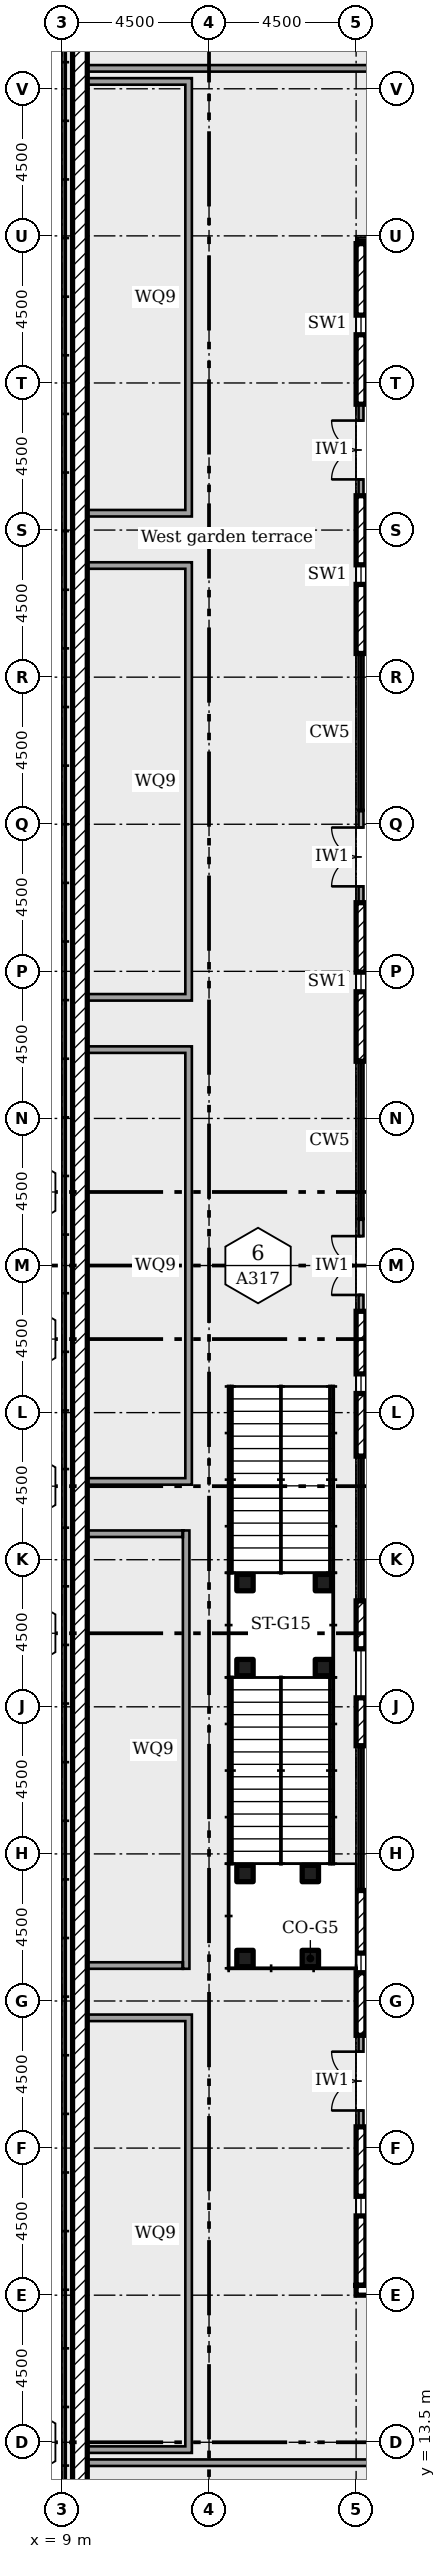
"""IFC4 building model, lengths in metres.
Left out: names, types, materials, properties, quantities, classifications, styles, units other than length and angle.
Written with IfcOpenShell. Run it as: python <this file> out.ifc"""

import sys

from ifc_helpers import new_model, si_unit, direction, frame, frame_2d, origin, origin_2d, place, context, subcontext, project, spatial, rectangle, extrude, element, fill, save


model = new_model("IFC4")
c1 = context("Model", 3, precision=1e-05, world=origin(), true_north=direction((0.0, 1.0)))
c2 = subcontext(c1, "Body", "Model", "MODEL_VIEW")
j1 = project(units=[si_unit("LENGTHUNIT", "METRE"), si_unit("PLANEANGLEUNIT", "RADIAN")], contexts=[c1])
p1 = place(None, origin())
s1 = spatial("IfcSite", under=j1, at=p1, CompositionType="ELEMENT")
p2 = place(p1, origin())
s2 = spatial("IfcBuilding", under=s1, at=p2, CompositionType="ELEMENT")
p3 = place(p2, frame((0.0, 0.0, 11.5)))
s3 = spatial("IfcBuildingStorey", under=s2, at=p3, CompositionType="ELEMENT", Elevation=11.5)
p4 = place(p3, frame((18.0, 18.15, 0.0)))
e1 = element("IfcWall", 1, at=p4, inside=s3, PredefinedType="ELEMENTEDWALL", context=c2, shape_type="SweptSolid", body=[
    extrude(rectangle(XDim=4.925, YDim=0.3, at=frame_2d((2.462, 0.0))), origin(), (0.0, 0.0, 1.0), 4.55),
])
p5 = place(p4, frame((2.163, 0.0, 0.45)))
e2 = element("IfcOpeningElement", 2, at=p5, cuts=e1, PredefinedType="OPENING", context=c2, shape_type="SweptSolid", body=[
    extrude(rectangle(XDim=0.6, YDim=2.4, at=frame_2d((0.3, 1.2))), frame((0.0, 0.16, 0.0), z_axis=(0.0, -1.0, 0.0), x_axis=(1.0, 0.0, 0.0)), (0.0, 0.0, 1.0), 0.32),
])
p6 = place(p3, frame((18.15, 80.762, 0.0), z_axis=(0.0, 0.0, 1.0), x_axis=(0.0, -1.0, 0.0)))
e3 = element("IfcWall", 3, at=p6, inside=s3, PredefinedType="ELEMENTEDWALL", context=c2, shape_type="SweptSolid", body=[
    extrude(rectangle(XDim=4.912, YDim=0.3, at=frame_2d((2.456, 0.0))), origin(), (0.0, 0.0, 1.0), 4.55),
])
p7 = place(p6, frame((2.188, 0.0, 0.45)))
e4 = element("IfcOpeningElement", 4, at=p7, cuts=e3, PredefinedType="OPENING", context=c2, shape_type="SweptSolid", body=[
    extrude(rectangle(XDim=0.6, YDim=2.4, at=frame_2d((0.3, 1.2))), frame((0.0, 0.16, 0.0), z_axis=(0.0, -1.0, 0.0), x_axis=(1.0, 0.0, 0.0)), (0.0, 0.0, 1.0), 0.32),
])
p8 = place(p3, frame((18.15, 75.85, 0.0), z_axis=(0.0, 0.0, 1.0), x_axis=(0.0, -1.0, 0.0)))
e5 = element("IfcWall", 5, at=p8, inside=s3, PredefinedType="SOLIDWALL", context=c2, shape_type="SweptSolid", body=[
    extrude(rectangle(XDim=2.8, YDim=0.15, at=frame_2d((1.4, 0.0))), origin(), (0.0, 0.0, 1.0), 4.55),
])
p9 = place(p8, frame((0.5, 0.0, 0.0)))
e6 = element("IfcOpeningElement", 6, at=p9, cuts=e5, PredefinedType="OPENING", context=c2, shape_type="SweptSolid", body=[
    extrude(rectangle(XDim=1.8, YDim=2.4, at=frame_2d((0.9, 1.2))), frame((0.0, 0.085, 0.0), z_axis=(0.0, -1.0, 0.0), x_axis=(1.0, 0.0, 0.0)), (0.0, 0.0, 1.0), 0.17),
])
p10 = place(p3, frame((18.15, 73.05, 0.0), z_axis=(0.0, 0.0, 1.0), x_axis=(0.0, -1.0, 0.0)))
e7 = element("IfcWall", 7, at=p10, inside=s3, PredefinedType="ELEMENTEDWALL", context=c2, shape_type="SweptSolid", body=[
    extrude(rectangle(XDim=4.825, YDim=0.3, at=frame_2d((2.413, 0.0))), origin(), (0.0, 0.0, 1.0), 4.55),
])
p11 = place(p10, frame((2.113, 0.0, 0.45)))
e8 = element("IfcOpeningElement", 8, at=p11, cuts=e7, PredefinedType="OPENING", context=c2, shape_type="SweptSolid", body=[
    extrude(rectangle(XDim=0.6, YDim=2.4, at=frame_2d((0.3, 1.2))), frame((0.0, 0.16, 0.0), z_axis=(0.0, -1.0, 0.0), x_axis=(1.0, 0.0, 0.0)), (0.0, 0.0, 1.0), 0.32),
])
p12 = place(p3, frame((18.15, 63.4, 0.0), z_axis=(0.0, 0.0, 1.0), x_axis=(0.0, -1.0, 0.0)))
e9 = element("IfcWall", 9, at=p12, inside=s3, PredefinedType="SOLIDWALL", context=c2, shape_type="SweptSolid", body=[
    extrude(rectangle(XDim=2.8, YDim=0.15, at=frame_2d((1.4, 0.0))), origin(), (0.0, 0.0, 1.0), 4.55),
])
p13 = place(p12, frame((0.5, 0.0, 0.0)))
e10 = element("IfcOpeningElement", 10, at=p13, cuts=e9, PredefinedType="OPENING", context=c2, shape_type="SweptSolid", body=[
    extrude(rectangle(XDim=1.8, YDim=2.4, at=frame_2d((0.9, 1.2))), frame((0.0, 0.085, 0.0), z_axis=(0.0, -1.0, 0.0), x_axis=(1.0, 0.0, 0.0)), (0.0, 0.0, 1.0), 0.17),
])
p14 = place(p3, frame((18.15, 60.6, 0.0), z_axis=(0.0, 0.0, 1.0), x_axis=(0.0, -1.0, 0.0)))
e11 = element("IfcWall", 11, at=p14, inside=s3, PredefinedType="ELEMENTEDWALL", context=c2, shape_type="SweptSolid", body=[
    extrude(rectangle(XDim=4.85, YDim=0.3, at=frame_2d((2.425, 0.0))), origin(), (0.0, 0.0, 1.0), 4.55),
])
p15 = place(p14, frame((2.125, 0.0, 0.45)))
e12 = element("IfcOpeningElement", 12, at=p15, cuts=e11, PredefinedType="OPENING", context=c2, shape_type="SweptSolid", body=[
    extrude(rectangle(XDim=0.6, YDim=2.4, at=frame_2d((0.3, 1.2))), frame((0.0, 0.16, 0.0), z_axis=(0.0, -1.0, 0.0), x_axis=(1.0, 0.0, 0.0)), (0.0, 0.0, 1.0), 0.32),
])
p16 = place(p3, frame((18.15, 50.9, 0.0), z_axis=(0.0, 0.0, 1.0), x_axis=(0.0, -1.0, 0.0)))
e13 = element("IfcWall", 13, at=p16, inside=s3, PredefinedType="SOLIDWALL", context=c2, shape_type="SweptSolid", body=[
    extrude(rectangle(XDim=2.8, YDim=0.15, at=frame_2d((1.4, 0.0))), origin(), (0.0, 0.0, 1.0), 4.55),
])
p17 = place(p16, frame((0.5, 0.0, 0.0)))
e14 = element("IfcOpeningElement", 14, at=p17, cuts=e13, PredefinedType="OPENING", context=c2, shape_type="SweptSolid", body=[
    extrude(rectangle(XDim=1.8, YDim=2.4, at=frame_2d((0.9, 1.2))), frame((0.0, 0.085, 0.0), z_axis=(0.0, -1.0, 0.0), x_axis=(1.0, 0.0, 0.0)), (0.0, 0.0, 1.0), 0.17),
])
p18 = place(p3, frame((18.15, 48.1, 0.0), z_axis=(0.0, 0.0, 1.0), x_axis=(0.0, -1.0, 0.0)))
e15 = element("IfcWall", 15, at=p18, inside=s3, PredefinedType="ELEMENTEDWALL", context=c2, shape_type="SweptSolid", body=[
    extrude(rectangle(XDim=4.43, YDim=0.3, at=frame_2d((2.215, 0.0))), origin(), (0.0, 0.0, 1.0), 4.55),
])
p19 = place(p18, frame((1.915, 0.0, 0.45)))
e16 = element("IfcOpeningElement", 16, at=p19, cuts=e15, PredefinedType="OPENING", context=c2, shape_type="SweptSolid", body=[
    extrude(rectangle(XDim=0.6, YDim=2.4, at=frame_2d((0.3, 1.2))), frame((0.0, 0.16, 0.0), z_axis=(0.0, -1.0, 0.0), x_axis=(1.0, 0.0, 0.0)), (0.0, 0.0, 1.0), 0.32),
])
p20 = place(p3, frame((18.15, 39.24, 0.0), z_axis=(0.0, 0.0, 1.0), x_axis=(0.0, -1.0, 0.0)))
e17 = element("IfcWall", 17, at=p20, inside=s3, PredefinedType="ELEMENTEDWALL", context=c2, shape_type="SweptSolid", body=[
    extrude(rectangle(XDim=4.43, YDim=0.3, at=frame_2d((2.215, 0.0))), origin(), (0.0, 0.0, 1.0), 4.55),
])
p21 = place(p20, frame((1.465, 0.0, 0.9)))
e18 = element("IfcOpeningElement", 18, at=p21, cuts=e17, PredefinedType="OPENING", context=c2, shape_type="SweptSolid", body=[
    extrude(rectangle(XDim=1.5, YDim=1.8, at=frame_2d((0.75, 0.9))), frame((0.0, 0.16, 0.0), z_axis=(0.0, -1.0, 0.0), x_axis=(1.0, 0.0, 0.0)), (0.0, 0.0, 1.0), 0.32),
])
p22 = place(p3, frame((18.15, 30.38, 0.0), z_axis=(0.0, 0.0, 1.0), x_axis=(0.0, -1.0, 0.0)))
e19 = element("IfcWall", 19, at=p22, inside=s3, PredefinedType="ELEMENTEDWALL", context=c2, shape_type="SweptSolid", body=[
    extrude(rectangle(XDim=4.43, YDim=0.3, at=frame_2d((2.215, 0.0))), origin(), (0.0, 0.0, 1.0), 4.55),
])
p23 = place(p22, frame((1.915, 0.0, 0.45)))
e20 = element("IfcOpeningElement", 20, at=p23, cuts=e19, PredefinedType="OPENING", context=c2, shape_type="SweptSolid", body=[
    extrude(rectangle(XDim=0.6, YDim=2.4, at=frame_2d((0.3, 1.2))), frame((0.0, 0.16, 0.0), z_axis=(0.0, -1.0, 0.0), x_axis=(1.0, 0.0, 0.0)), (0.0, 0.0, 1.0), 0.32),
])
p24 = place(p3, frame((18.15, 25.95, 0.0), z_axis=(0.0, 0.0, 1.0), x_axis=(0.0, -1.0, 0.0)))
e21 = element("IfcWall", 21, at=p24, inside=s3, PredefinedType="SOLIDWALL", context=c2, shape_type="SweptSolid", body=[
    extrude(rectangle(XDim=2.8, YDim=0.15, at=frame_2d((1.4, 0.0))), origin(), (0.0, 0.0, 1.0), 4.55),
])
p25 = place(p24, frame((0.5, 0.0, 0.0)))
e22 = element("IfcOpeningElement", 22, at=p25, cuts=e21, PredefinedType="OPENING", context=c2, shape_type="SweptSolid", body=[
    extrude(rectangle(XDim=1.8, YDim=2.4, at=frame_2d((0.9, 1.2))), frame((0.0, 0.085, 0.0), z_axis=(0.0, -1.0, 0.0), x_axis=(1.0, 0.0, 0.0)), (0.0, 0.0, 1.0), 0.17),
])
p26 = place(p3, frame((18.15, 23.15, 0.0), z_axis=(0.0, 0.0, 1.0), x_axis=(0.0, -1.0, 0.0)))
e23 = element("IfcWall", 23, at=p26, inside=s3, PredefinedType="ELEMENTEDWALL", context=c2, shape_type="SweptSolid", body=[
    extrude(rectangle(XDim=4.85, YDim=0.3, at=frame_2d((2.425, 0.0))), origin(), (0.0, 0.0, 1.0), 4.55),
])
p27 = place(p26, frame((2.125, 0.0, 0.45)))
e24 = element("IfcOpeningElement", 24, at=p27, cuts=e23, PredefinedType="OPENING", context=c2, shape_type="SweptSolid", body=[
    extrude(rectangle(XDim=0.6, YDim=2.4, at=frame_2d((0.3, 1.2))), frame((0.0, 0.16, 0.0), z_axis=(0.0, -1.0, 0.0), x_axis=(1.0, 0.0, 0.0)), (0.0, 0.0, 1.0), 0.32),
])
p28 = place(p3, frame((9.55, 89.225, 0.0), z_axis=(0.0, 0.0, 1.0), x_axis=(0.0, -1.0, 0.0)))
e25 = element("IfcWall", 25, at=p28, inside=s3, PredefinedType="SOLIDWALL", context=c2, shape_type="SweptSolid", body=[
    extrude(rectangle(XDim=79.45, YDim=0.45, at=frame_2d((39.725, 0.0))), origin(), (0.0, 0.0, 1.0), 0.6),
])
for number, where in (
    (26, (9.775, 12.875, 0.0)),
    (27, (9.775, 86.125, 0.0)),
):
    element("IfcWall", number, at=place(p3, frame(where)), inside=s3, PredefinedType="SOLIDWALL", context=c2, shape_type="SweptSolid", body=[
        extrude(rectangle(XDim=13.221, YDim=0.2, at=frame_2d((6.61, 0.0))), origin(), (0.0, 0.0, 1.0), 0.45),
    ])
p29 = place(p3, frame((12.875, 13.175, 0.0), z_axis=(0.0, 0.0, 1.0), x_axis=(0.0, 1.0, 0.0)))
e28 = element("IfcWall", 28, at=p29, inside=s3, PredefinedType="SOLIDWALL", context=c2, shape_type="SweptSolid", body=[
    extrude(rectangle(XDim=13.41, YDim=0.2, at=frame_2d((6.705, 0.0))), origin(), (0.0, 0.0, 1.0), 0.45),
])
for number, where in (
    (29, (9.775, 26.485, 0.0)),
    (30, (9.775, 13.275, 0.0)),
):
    element("IfcWall", number, at=place(p3, frame(where)), inside=s3, PredefinedType="SOLIDWALL", context=c2, shape_type="SweptSolid", body=[
        extrude(rectangle(XDim=3.0, YDim=0.2, at=frame_2d((1.5, 0.0))), origin(), (0.0, 0.0, 1.0), 0.45),
    ])
p30 = place(p3, frame((12.8, 27.985, 0.0), z_axis=(0.0, 0.0, 1.0), x_axis=(0.0, 1.0, 0.0)))
e31 = element("IfcWall", 31, at=p30, inside=s3, PredefinedType="SOLIDWALL", context=c2, shape_type="SweptSolid", body=[
    extrude(rectangle(XDim=13.41, YDim=0.2, at=frame_2d((6.705, 0.0))), origin(), (0.0, 0.0, 1.0), 0.45),
])
for number, where in (
    (32, (9.775, 41.295, 0.0)),
    (33, (9.775, 28.085, 0.0)),
):
    element("IfcWall", number, at=place(p3, frame(where)), inside=s3, PredefinedType="SOLIDWALL", context=c2, shape_type="SweptSolid", body=[
        extrude(rectangle(XDim=2.925, YDim=0.2, at=frame_2d((1.462, 0.0))), origin(), (0.0, 0.0, 1.0), 0.45),
    ])
p31 = place(p3, frame((12.875, 42.795, 0.0), z_axis=(0.0, 0.0, 1.0), x_axis=(0.0, 1.0, 0.0)))
e34 = element("IfcWall", 34, at=p31, inside=s3, PredefinedType="SOLIDWALL", context=c2, shape_type="SweptSolid", body=[
    extrude(rectangle(XDim=13.41, YDim=0.2, at=frame_2d((6.705, 0.0))), origin(), (0.0, 0.0, 1.0), 0.45),
])
for number, where in (
    (35, (9.775, 56.105, 0.0)),
    (36, (9.775, 42.895, 0.0)),
):
    element("IfcWall", number, at=place(p3, frame(where)), inside=s3, PredefinedType="SOLIDWALL", context=c2, shape_type="SweptSolid", body=[
        extrude(rectangle(XDim=3.0, YDim=0.2, at=frame_2d((1.5, 0.0))), origin(), (0.0, 0.0, 1.0), 0.45),
    ])
p32 = place(p3, frame((12.875, 57.605, 0.0), z_axis=(0.0, 0.0, 1.0), x_axis=(0.0, 1.0, 0.0)))
e37 = element("IfcWall", 37, at=p32, inside=s3, PredefinedType="SOLIDWALL", context=c2, shape_type="SweptSolid", body=[
    extrude(rectangle(XDim=13.41, YDim=0.2, at=frame_2d((6.705, 0.0))), origin(), (0.0, 0.0, 1.0), 0.45),
])
for number, where in (
    (38, (9.775, 70.915, 0.0)),
    (39, (9.775, 57.705, 0.0)),
):
    element("IfcWall", number, at=place(p3, frame(where)), inside=s3, PredefinedType="SOLIDWALL", context=c2, shape_type="SweptSolid", body=[
        extrude(rectangle(XDim=3.0, YDim=0.2, at=frame_2d((1.5, 0.0))), origin(), (0.0, 0.0, 1.0), 0.45),
    ])
p33 = place(p3, frame((12.875, 72.415, 0.0), z_axis=(0.0, 0.0, 1.0), x_axis=(0.0, 1.0, 0.0)))
e40 = element("IfcWall", 40, at=p33, inside=s3, PredefinedType="SOLIDWALL", context=c2, shape_type="SweptSolid", body=[
    extrude(rectangle(XDim=13.41, YDim=0.2, at=frame_2d((6.705, 0.0))), origin(), (0.0, 0.0, 1.0), 0.45),
])
for number, where in (
    (41, (9.775, 85.725, 0.0)),
    (42, (9.775, 72.515, 0.0)),
):
    element("IfcWall", number, at=place(p3, frame(where)), inside=s3, PredefinedType="SOLIDWALL", context=c2, shape_type="SweptSolid", body=[
        extrude(rectangle(XDim=3.0, YDim=0.2, at=frame_2d((1.5, 0.0))), origin(), (0.0, 0.0, 1.0), 0.45),
    ])
for number, where in (
    (43, (16.6, 28.3, 0.0)),
    (44, (14.6, 28.3, 0.0)),
    (45, (16.6, 30.9, 0.0)),
    (46, (14.6, 30.9, 0.0)),
):
    element("IfcColumn", number, at=place(p3, frame(where)), inside=s3, PredefinedType="COLUMN", context=c2, shape_type="SweptSolid", body=[
        extrude(rectangle(XDim=0.5, YDim=0.5, at=origin_2d()), origin(), (0.0, 0.0, 1.0), 4.75),
    ])
for number, where in (
    (47, (17.0, 37.2, 0.0)),
    (48, (14.6, 37.2, 0.0)),
    (49, (17.0, 39.8, 0.0)),
    (50, (14.6, 39.8, 0.0)),
):
    element("IfcColumn", number, at=place(p3, frame(where)), inside=s3, PredefinedType="COLUMN", context=c2, shape_type="SweptSolid", body=[
        extrude(rectangle(XDim=0.5, YDim=0.5, at=origin_2d()), origin(), (0.0, 0.0, 1.0), 2.25),
    ])
p34 = place(p7, origin())
e51 = element("IfcWindow", 51, at=p34, inside=s3, PartitioningType="SINGLE_PANEL", PredefinedType="WINDOW", context=c2, shape_type="SweptSolid", body=[
    extrude(rectangle(XDim=0.6, YDim=2.4, at=frame_2d((0.3, 1.2))), frame((0.0, 0.03, 0.0), z_axis=(0.0, -1.0, 0.0), x_axis=(1.0, 0.0, 0.0)), (0.0, 0.0, 1.0), 0.06),
])
fill(e4, e51)
p35 = place(p9, frame((1.8, 0.0, 0.0), x_axis=(-1.0, 0.0, 0.0)))
e52 = element("IfcDoor", 52, at=p35, inside=s3, OperationType="DOUBLE_DOOR_DOUBLE_SWING", PredefinedType="NOTDEFINED", context=c2, shape_type="SweptSolid", body=[
    extrude(rectangle(XDim=1.8, YDim=2.4, at=frame_2d((0.9, 1.2))), frame((0.0, 0.025, 0.0), z_axis=(0.0, -1.0, 0.0), x_axis=(1.0, 0.0, 0.0)), (0.0, 0.0, 1.0), 0.05),
])
fill(e6, e52)
p36 = place(p11, origin())
e53 = element("IfcWindow", 53, at=p36, inside=s3, PartitioningType="SINGLE_PANEL", PredefinedType="WINDOW", context=c2, shape_type="SweptSolid", body=[
    extrude(rectangle(XDim=0.6, YDim=2.4, at=frame_2d((0.3, 1.2))), frame((0.0, 0.03, 0.0), z_axis=(0.0, -1.0, 0.0), x_axis=(1.0, 0.0, 0.0)), (0.0, 0.0, 1.0), 0.06),
])
fill(e8, e53)
p37 = place(p13, frame((1.8, 0.0, 0.0), x_axis=(-1.0, 0.0, 0.0)))
e54 = element("IfcDoor", 54, at=p37, inside=s3, OperationType="DOUBLE_DOOR_DOUBLE_SWING", PredefinedType="NOTDEFINED", context=c2, shape_type="SweptSolid", body=[
    extrude(rectangle(XDim=1.8, YDim=2.4, at=frame_2d((0.9, 1.2))), frame((0.0, 0.025, 0.0), z_axis=(0.0, -1.0, 0.0), x_axis=(1.0, 0.0, 0.0)), (0.0, 0.0, 1.0), 0.05),
])
fill(e10, e54)
p38 = place(p15, origin())
e55 = element("IfcWindow", 55, at=p38, inside=s3, PartitioningType="SINGLE_PANEL", PredefinedType="WINDOW", context=c2, shape_type="SweptSolid", body=[
    extrude(rectangle(XDim=0.6, YDim=2.4, at=frame_2d((0.3, 1.2))), frame((0.0, 0.03, 0.0), z_axis=(0.0, -1.0, 0.0), x_axis=(1.0, 0.0, 0.0)), (0.0, 0.0, 1.0), 0.06),
])
fill(e12, e55)
p39 = place(p17, frame((1.8, 0.0, 0.0), x_axis=(-1.0, 0.0, 0.0)))
e56 = element("IfcDoor", 56, at=p39, inside=s3, OperationType="DOUBLE_DOOR_DOUBLE_SWING", PredefinedType="NOTDEFINED", context=c2, shape_type="SweptSolid", body=[
    extrude(rectangle(XDim=1.8, YDim=2.4, at=frame_2d((0.9, 1.2))), frame((0.0, 0.025, 0.0), z_axis=(0.0, -1.0, 0.0), x_axis=(1.0, 0.0, 0.0)), (0.0, 0.0, 1.0), 0.05),
])
fill(e14, e56)
p40 = place(p19, origin())
e57 = element("IfcWindow", 57, at=p40, inside=s3, PartitioningType="SINGLE_PANEL", PredefinedType="WINDOW", context=c2, shape_type="SweptSolid", body=[
    extrude(rectangle(XDim=0.6, YDim=2.4, at=frame_2d((0.3, 1.2))), frame((0.0, 0.03, 0.0), z_axis=(0.0, -1.0, 0.0), x_axis=(1.0, 0.0, 0.0)), (0.0, 0.0, 1.0), 0.06),
])
fill(e16, e57)
p41 = place(p21, origin())
e58 = element("IfcWindow", 58, at=p41, inside=s3, PartitioningType="SINGLE_PANEL", PredefinedType="WINDOW", context=c2, shape_type="SweptSolid", body=[
    extrude(rectangle(XDim=1.5, YDim=1.8, at=frame_2d((0.75, 0.9))), frame((0.0, 0.03, 0.0), z_axis=(0.0, -1.0, 0.0), x_axis=(1.0, 0.0, 0.0)), (0.0, 0.0, 1.0), 0.06),
])
fill(e18, e58)
p42 = place(p23, origin())
e59 = element("IfcWindow", 59, at=p42, inside=s3, PartitioningType="SINGLE_PANEL", PredefinedType="WINDOW", context=c2, shape_type="SweptSolid", body=[
    extrude(rectangle(XDim=0.6, YDim=2.4, at=frame_2d((0.3, 1.2))), frame((0.0, 0.03, 0.0), z_axis=(0.0, -1.0, 0.0), x_axis=(1.0, 0.0, 0.0)), (0.0, 0.0, 1.0), 0.06),
])
fill(e20, e59)
p43 = place(p25, frame((1.8, 0.0, 0.0), x_axis=(-1.0, 0.0, 0.0)))
e60 = element("IfcDoor", 60, at=p43, inside=s3, OperationType="DOUBLE_DOOR_DOUBLE_SWING", PredefinedType="NOTDEFINED", context=c2, shape_type="SweptSolid", body=[
    extrude(rectangle(XDim=1.8, YDim=2.4, at=frame_2d((0.9, 1.2))), frame((0.0, 0.025, 0.0), z_axis=(0.0, -1.0, 0.0), x_axis=(1.0, 0.0, 0.0)), (0.0, 0.0, 1.0), 0.05),
])
fill(e22, e60)
p44 = place(p27, origin())
e61 = element("IfcWindow", 61, at=p44, inside=s3, PartitioningType="SINGLE_PANEL", PredefinedType="WINDOW", context=c2, shape_type="SweptSolid", body=[
    extrude(rectangle(XDim=0.6, YDim=2.4, at=frame_2d((0.3, 1.2))), frame((0.0, 0.03, 0.0), z_axis=(0.0, -1.0, 0.0), x_axis=(1.0, 0.0, 0.0)), (0.0, 0.0, 1.0), 0.06),
])
fill(e24, e61)
save(model, sys.argv[1])
